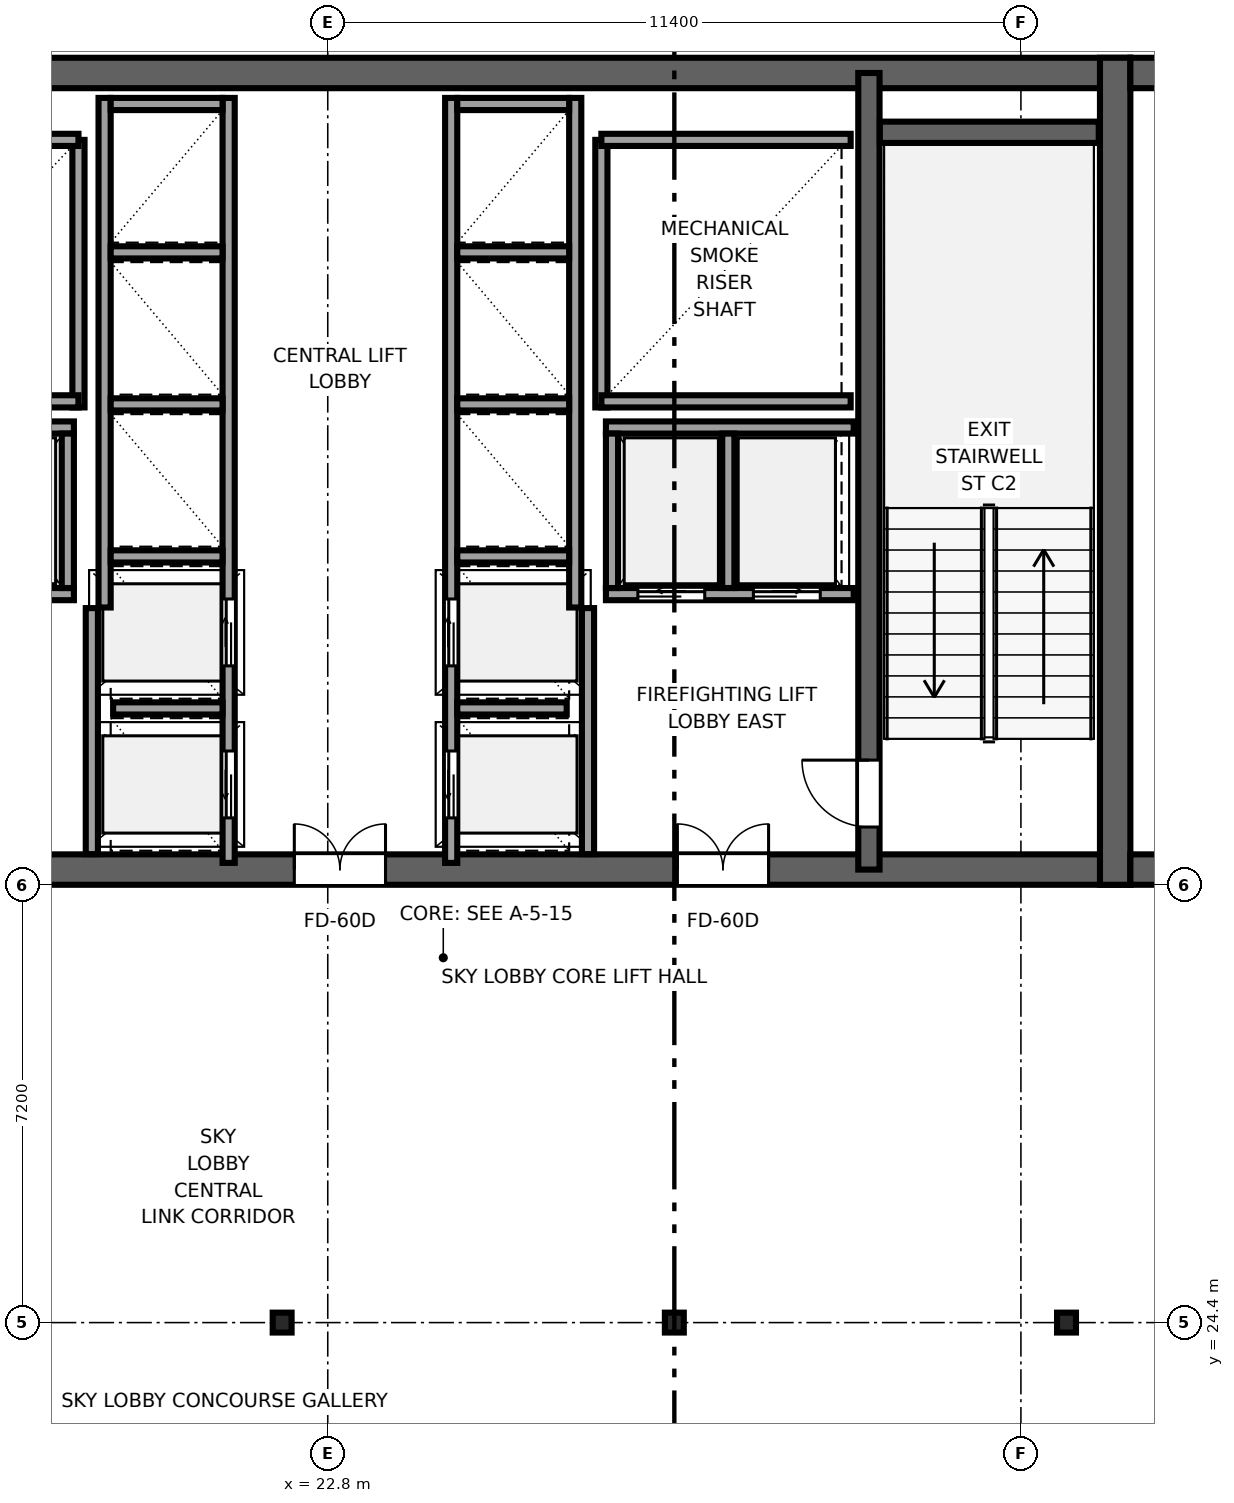
"""IFC4 building model, lengths in metres.
Left out: names, types, materials, properties, quantities, classifications, styles, units other than length and angle.
Written with IfcOpenShell. Run it as: python <this file> out.ifc"""

import sys

from ifc_helpers import new_model, si_unit, direction, frame, frame_2d, origin, origin_2d, place, context, subcontext, project, spatial, rectangle, i_section, extrude, source, transform, mapped, element, fill, save


model = new_model("IFC4")
c1 = context("Model", 3, precision=1e-05, world=origin(), true_north=direction((0.0, 1.0)))
c2 = subcontext(c1, "Body", "Model", "MODEL_VIEW")
j1 = project(units=[si_unit("LENGTHUNIT", "METRE"), si_unit("PLANEANGLEUNIT", "RADIAN")], contexts=[c1])
p1 = place(None, origin())
s1 = spatial("IfcSite", under=j1, at=p1, CompositionType="ELEMENT")
p2 = place(p1, origin())
s2 = spatial("IfcBuilding", under=s1, at=p2, CompositionType="ELEMENT")
p3 = place(p2, frame((0.0, 0.0, 205.3)))
s3 = spatial("IfcBuildingStorey", under=s2, at=p3, CompositionType="ELEMENT", Elevation=205.3)
p4 = place(p3, frame((10.0, 31.85, 0.0), z_axis=(0.0, 0.0, 1.0), x_axis=(1.0, 0.0, 0.0)))
e1 = element("IfcWall", 1, at=p4, inside=s3, PredefinedType="SHEAR", context=c2, shape_type="SweptSolid", body=[
    extrude(rectangle(XDim=26.0, YDim=0.5, at=frame_2d((13.0, 0.0))), origin(), (0.0, 0.0, 1.0), 4.4),
])
p5 = place(p4, frame((7.45, 0.0, 0.0), z_axis=(0.0, 0.0, 1.0), x_axis=(-1.0, 0.0, 0.0)))
e2 = element("IfcOpeningElement", 2, at=p5, cuts=e1, PredefinedType="OPENING", context=c2, shape_type="SweptSolid", body=[
    extrude(rectangle(XDim=1.5, YDim=2.04, at=frame_2d((0.75, 1.02))), frame((0.0, 0.26, 0.0), z_axis=(0.0, -1.0, 0.0), x_axis=(1.0, 0.0, 0.0)), (0.0, 0.0, 1.0), 0.52),
])
p6 = place(p4, frame((13.75, 0.0, 0.0), z_axis=(0.0, 0.0, 1.0), x_axis=(-1.0, 0.0, 0.0)))
e3 = element("IfcOpeningElement", 3, at=p6, cuts=e1, PredefinedType="OPENING", context=c2, shape_type="SweptSolid", body=[
    extrude(rectangle(XDim=1.5, YDim=2.04, at=frame_2d((0.75, 1.02))), frame((0.0, 0.26, 0.0), z_axis=(0.0, -1.0, 0.0), x_axis=(1.0, 0.0, 0.0)), (0.0, 0.0, 1.0), 0.52),
])
p7 = place(p4, frame((20.05, 0.0, 0.0), z_axis=(0.0, 0.0, 1.0), x_axis=(-1.0, 0.0, 0.0)))
e4 = element("IfcOpeningElement", 4, at=p7, cuts=e1, PredefinedType="OPENING", context=c2, shape_type="SweptSolid", body=[
    extrude(rectangle(XDim=1.5, YDim=2.04, at=frame_2d((0.75, 1.02))), frame((0.0, 0.26, 0.0), z_axis=(0.0, -1.0, 0.0), x_axis=(1.0, 0.0, 0.0)), (0.0, 0.0, 1.0), 0.52),
])
p8 = place(p3, frame((10.0, 44.95, 0.0), z_axis=(0.0, 0.0, 1.0), x_axis=(1.0, 0.0, 0.0)))
e5 = element("IfcWall", 5, at=p8, inside=s3, PredefinedType="SHEAR", context=c2, shape_type="SweptSolid", body=[
    extrude(rectangle(XDim=26.0, YDim=0.5, at=frame_2d((13.0, 0.0))), origin(), (0.0, 0.0, 1.0), 4.4),
])
p9 = place(p3, frame((35.75, 31.6, 0.0), z_axis=(0.0, 0.0, 1.0), x_axis=(0.0, 1.0, 0.0)))
e6 = element("IfcWall", 6, at=p9, inside=s3, PredefinedType="SHEAR", context=c2, shape_type="SweptSolid", body=[
    extrude(rectangle(XDim=13.6, YDim=0.5, at=frame_2d((6.8, 0.0))), origin(), (0.0, 0.0, 1.0), 4.4),
])
p10 = place(p3, frame((31.7, 31.85, 0.0), z_axis=(0.0, 0.0, 1.0), x_axis=(0.0, 1.0, 0.0)))
e7 = element("IfcWall", 7, at=p10, inside=s3, PredefinedType="SHEAR", context=c2, shape_type="SweptSolid", body=[
    extrude(rectangle(XDim=13.1, YDim=0.35, at=frame_2d((6.55, 0.0))), origin(), (0.0, 0.0, 1.0), 4.4),
])
p11 = place(p10, frame((1.8, 0.0, 0.0), z_axis=(0.0, 0.0, 1.0), x_axis=(-1.0, 0.0, 0.0)))
e8 = element("IfcOpeningElement", 8, at=p11, cuts=e7, PredefinedType="OPENING", context=c2, shape_type="SweptSolid", body=[
    extrude(rectangle(XDim=1.1, YDim=2.12, at=frame_2d((0.55, 1.06))), frame((0.0, 0.185, 0.0), z_axis=(0.0, -1.0, 0.0), x_axis=(1.0, 0.0, 0.0)), (0.0, 0.0, 1.0), 0.37),
])
p12 = place(p3, frame((36.0, 31.85, 0.0), z_axis=(0.0, 0.0, 1.0), x_axis=(1.0, 0.0, 0.0)))
e9 = element("IfcWall", 9, at=p12, inside=s3, PredefinedType="SHEAR", context=c2, shape_type="SweptSolid", body=[
    extrude(rectangle(XDim=3.8, YDim=0.5, at=frame_2d((1.9, 0.0))), origin(), (0.0, 0.0, 1.0), 4.4),
])
p13 = place(p12, frame((1.54, 0.0, 0.0), z_axis=(0.0, 0.0, 1.0), x_axis=(-1.0, 0.0, 0.0)))
e10 = element("IfcOpeningElement", 10, at=p13, cuts=e9, PredefinedType="OPENING", context=c2, shape_type="SweptSolid", body=[
    extrude(rectangle(XDim=1.02, YDim=2.03, at=frame_2d((0.51, 1.015))), frame((0.0, 0.26, 0.0), z_axis=(0.0, -1.0, 0.0), x_axis=(1.0, 0.0, 0.0)), (0.0, 0.0, 1.0), 0.52),
])
p14 = place(p3, frame((36.0, 44.95, 0.0), z_axis=(0.0, 0.0, 1.0), x_axis=(1.0, 0.0, 0.0)))
e11 = element("IfcWall", 11, at=p14, inside=s3, PredefinedType="SHEAR", context=c2, shape_type="SweptSolid", body=[
    extrude(rectangle(XDim=1.35, YDim=0.5, at=frame_2d((0.675, 0.0))), origin(), (0.0, 0.0, 1.0), 4.4),
])
p15 = place(p3, frame((31.88, 43.975, 0.0), z_axis=(0.0, 0.0, 1.0), x_axis=(1.0, 0.0, 0.0)))
e12 = element("IfcWall", 12, at=p15, inside=s3, PredefinedType="SHEAR", context=c2, shape_type="SweptSolid", body=[
    extrude(rectangle(XDim=3.6, YDim=0.35, at=frame_2d((1.8, 0.0))), origin(), (0.0, 0.0, 1.0), 4.4),
])
m1 = source(origin(), c2, "Body", "SweptSolid", [
    extrude(i_section(OverallWidth=0.311, OverallDepth=0.327, WebThickness=0.016, FlangeThickness=0.025, FilletRadius=0.017, at=origin_2d()), origin(), (0.0, 0.0, 1.0), 4.4),
])
for number, where, z_axis, x_axis in (
    (13, (22.05, 24.4, 0.0), (0.0, 0.0, 1.0), (1.0, 0.0, 0.0)),
    (14, (28.5, 24.4, 0.0), (0.0, 0.0, 1.0), (1.0, 0.0, 0.0)),
    (15, (34.95, 24.4, 0.0), (0.0, 0.0, 1.0), (1.0, 0.0, 0.0)),
):
    element("IfcColumn", number, at=place(p3, frame(where, z_axis=z_axis, x_axis=x_axis)), inside=s3, PredefinedType="COLUMN", context=c2, shape_type="MappedRepresentation", body=[
        mapped(m1, transform((0.0, 0.0, 0.0), x_axis=(1.0, 0.0, 0.0), y_axis=(0.0, 1.0, 0.0), z_axis=(0.0, 0.0, 1.0), scale=1.0)),
    ])
p16 = place(p3, frame((18.7, 39.45, 0.0), z_axis=(0.0, 0.0, 1.0), x_axis=(0.0, 1.0, 0.0)))
e16 = element("IfcWall", 16, at=p16, inside=s3, PredefinedType="SOLIDWALL", context=c2, shape_type="SweptSolid", body=[
    extrude(rectangle(XDim=4.4, YDim=0.2, at=frame_2d((2.2, 0.0))), origin(), (0.0, 0.0, 1.0), 4.22),
])
for number, where, z_axis, x_axis in (
    (17, (14.6, 39.55, 0.0), (0.0, 0.0, 1.0), (1.0, 0.0, 0.0)),
    (18, (14.6, 43.85, 0.0), (0.0, 0.0, 1.0), (1.0, 0.0, 0.0)),
):
    element("IfcWall", number, at=place(p3, frame(where, z_axis=z_axis, x_axis=x_axis)), inside=s3, PredefinedType="SOLIDWALL", context=c2, shape_type="SweptSolid", body=[
        extrude(rectangle(XDim=4.1, YDim=0.2, at=frame_2d((2.05, 0.0))), origin(), (0.0, 0.0, 1.0), 4.22),
    ])
p17 = place(p3, frame((27.3, 39.45, 0.0), z_axis=(0.0, 0.0, 1.0), x_axis=(0.0, 1.0, 0.0)))
e19 = element("IfcWall", 19, at=p17, inside=s3, PredefinedType="SOLIDWALL", context=c2, shape_type="SweptSolid", body=[
    extrude(rectangle(XDim=4.4, YDim=0.2, at=frame_2d((2.2, 0.0))), origin(), (0.0, 0.0, 1.0), 4.22),
])
for number, where, z_axis, x_axis in (
    (20, (27.3, 39.55, 0.0), (0.0, 0.0, 1.0), (1.0, 0.0, 0.0)),
    (21, (27.3, 43.85, 0.0), (0.0, 0.0, 1.0), (1.0, 0.0, 0.0)),
):
    element("IfcWall", number, at=place(p3, frame(where, z_axis=z_axis, x_axis=x_axis)), inside=s3, PredefinedType="SOLIDWALL", context=c2, shape_type="SweptSolid", body=[
        extrude(rectangle(XDim=4.1, YDim=0.2, at=frame_2d((2.05, 0.0))), origin(), (0.0, 0.0, 1.0), 4.22),
    ])
for number, where, z_axis, x_axis in (
    (22, (18.92, 32.104, 0.0), (0.0, 0.0, 1.0), (0.0, 1.0, 0.0)),
    (23, (27.08, 32.104, 0.0), (0.0, 0.0, 1.0), (0.0, 1.0, 0.0)),
):
    element("IfcWall", number, at=place(p3, frame(where, z_axis=z_axis, x_axis=x_axis)), inside=s3, PredefinedType="SOLIDWALL", context=c2, shape_type="SweptSolid", body=[
        extrude(rectangle(XDim=4.046, YDim=0.2, at=frame_2d((2.023, 0.0))), origin(), (0.0, 0.0, 1.0), 4.22),
    ])
p18 = place(p3, frame((21.17, 31.96, 0.0), z_axis=(0.0, 0.0, 1.0), x_axis=(0.0, 1.0, 0.0)))
e24 = element("IfcWall", 24, at=p18, inside=s3, PredefinedType="SOLIDWALL", context=c2, shape_type="SweptSolid", body=[
    extrude(rectangle(XDim=12.58, YDim=0.2, at=frame_2d((6.29, 0.0))), origin(), (0.0, 0.0, 1.0), 4.22),
])
p19 = place(p18, frame((0.74, 0.0, 0.0)))
e25 = element("IfcOpeningElement", 25, at=p19, cuts=e24, PredefinedType="OPENING", context=c2, shape_type="SweptSolid", body=[
    extrude(rectangle(XDim=1.1, YDim=2.12, at=frame_2d((0.55, 1.06))), frame((0.0, 0.11, 0.0), z_axis=(0.0, -1.0, 0.0), x_axis=(1.0, 0.0, 0.0)), (0.0, 0.0, 1.0), 0.22),
])
p20 = place(p18, frame((3.24, 0.0, 0.0)))
e26 = element("IfcOpeningElement", 26, at=p20, cuts=e24, PredefinedType="OPENING", context=c2, shape_type="SweptSolid", body=[
    extrude(rectangle(XDim=1.1, YDim=2.12, at=frame_2d((0.55, 1.06))), frame((0.0, 0.11, 0.0), z_axis=(0.0, -1.0, 0.0), x_axis=(1.0, 0.0, 0.0)), (0.0, 0.0, 1.0), 0.22),
])
p21 = place(p3, frame((19.13, 36.16, 0.0), z_axis=(0.0, 0.0, 1.0), x_axis=(0.0, 1.0, 0.0)))
e27 = element("IfcWall", 27, at=p21, inside=s3, PredefinedType="SOLIDWALL", context=c2, shape_type="SweptSolid", body=[
    extrude(rectangle(XDim=8.38, YDim=0.2, at=frame_2d((4.19, 0.0))), origin(), (0.0, 0.0, 1.0), 4.22),
])
p22 = place(p3, frame((19.23, 44.44, 0.0), z_axis=(0.0, 0.0, 1.0), x_axis=(1.0, 0.0, 0.0)))
e28 = element("IfcWall", 28, at=p22, inside=s3, PredefinedType="SOLIDWALL", context=c2, shape_type="SweptSolid", body=[
    extrude(rectangle(XDim=1.84, YDim=0.2, at=frame_2d((0.92, 0.0))), origin(), (0.0, 0.0, 1.0), 4.22),
])
p23 = place(p3, frame((19.27, 34.5, 0.0), z_axis=(0.0, 0.0, 1.0), x_axis=(1.0, 0.0, 0.0)))
e29 = element("IfcWall", 29, at=p23, inside=s3, PredefinedType="SOLIDWALL", context=c2, shape_type="SweptSolid", body=[
    extrude(rectangle(XDim=1.8, YDim=0.2, at=frame_2d((0.9, 0.0))), origin(), (0.0, 0.0, 1.0), 4.22),
])
for number, where, z_axis, x_axis in (
    (30, (19.23, 37.0, 0.0), (0.0, 0.0, 1.0), (1.0, 0.0, 0.0)),
    (31, (19.23, 39.5, 0.0), (0.0, 0.0, 1.0), (1.0, 0.0, 0.0)),
    (32, (19.23, 42.0, 0.0), (0.0, 0.0, 1.0), (1.0, 0.0, 0.0)),
):
    element("IfcWall", number, at=place(p3, frame(where, z_axis=z_axis, x_axis=x_axis)), inside=s3, PredefinedType="SOLIDWALL", context=c2, shape_type="SweptSolid", body=[
        extrude(rectangle(XDim=1.84, YDim=0.2, at=frame_2d((0.92, 0.0))), origin(), (0.0, 0.0, 1.0), 4.22),
    ])
p24 = place(p3, frame((27.375, 36.38, 0.0), z_axis=(0.0, 0.0, 1.0), x_axis=(1.0, 0.0, 0.0)))
e33 = element("IfcWall", 33, at=p24, inside=s3, PredefinedType="SOLIDWALL", context=c2, shape_type="SweptSolid", body=[
    extrude(rectangle(XDim=4.075, YDim=0.2, at=frame_2d((2.038, 0.0))), origin(), (0.0, 0.0, 1.0), 4.22),
])
p25 = place(p24, frame((0.525, 0.0, 0.0)))
e34 = element("IfcOpeningElement", 34, at=p25, cuts=e33, PredefinedType="OPENING", context=c2, shape_type="SweptSolid", body=[
    extrude(rectangle(XDim=1.1, YDim=2.12, at=frame_2d((0.55, 1.06))), frame((0.0, 0.11, 0.0), z_axis=(0.0, -1.0, 0.0), x_axis=(1.0, 0.0, 0.0)), (0.0, 0.0, 1.0), 0.22),
])
p26 = place(p24, frame((2.425, 0.0, 0.0)))
e35 = element("IfcOpeningElement", 35, at=p26, cuts=e33, PredefinedType="OPENING", context=c2, shape_type="SweptSolid", body=[
    extrude(rectangle(XDim=1.1, YDim=2.12, at=frame_2d((0.55, 1.06))), frame((0.0, 0.11, 0.0), z_axis=(0.0, -1.0, 0.0), x_axis=(1.0, 0.0, 0.0)), (0.0, 0.0, 1.0), 0.22),
])
p27 = place(p3, frame((27.375, 39.12, 0.0), z_axis=(0.0, 0.0, 1.0), x_axis=(1.0, 0.0, 0.0)))
e36 = element("IfcWall", 36, at=p27, inside=s3, PredefinedType="SOLIDWALL", context=c2, shape_type="SweptSolid", body=[
    extrude(rectangle(XDim=4.075, YDim=0.2, at=frame_2d((2.038, 0.0))), origin(), (0.0, 0.0, 1.0), 4.22),
])
for number, where, z_axis, x_axis in (
    (37, (27.475, 36.48, 0.0), (0.0, 0.0, 1.0), (0.0, 1.0, 0.0)),
    (38, (29.387, 36.48, 0.0), (0.0, 0.0, 1.0), (0.0, 1.0, 0.0)),
):
    element("IfcWall", number, at=place(p3, frame(where, z_axis=z_axis, x_axis=x_axis)), inside=s3, PredefinedType="SOLIDWALL", context=c2, shape_type="SweptSolid", body=[
        extrude(rectangle(XDim=2.54, YDim=0.2, at=frame_2d((1.27, 0.0))), origin(), (0.0, 0.0, 1.0), 4.22),
    ])
p28 = place(p3, frame((14.55, 36.38, 0.0), z_axis=(0.0, 0.0, 1.0), x_axis=(1.0, 0.0, 0.0)))
e39 = element("IfcWall", 39, at=p28, inside=s3, PredefinedType="SOLIDWALL", context=c2, shape_type="SweptSolid", body=[
    extrude(rectangle(XDim=4.075, YDim=0.2, at=frame_2d((2.038, 0.0))), origin(), (0.0, 0.0, 1.0), 4.22),
])
p29 = place(p28, frame((0.55, 0.0, 0.0)))
e40 = element("IfcOpeningElement", 40, at=p29, cuts=e39, PredefinedType="OPENING", context=c2, shape_type="SweptSolid", body=[
    extrude(rectangle(XDim=1.1, YDim=2.12, at=frame_2d((0.55, 1.06))), frame((0.0, 0.11, 0.0), z_axis=(0.0, -1.0, 0.0), x_axis=(1.0, 0.0, 0.0)), (0.0, 0.0, 1.0), 0.22),
])
p30 = place(p28, frame((2.45, 0.0, 0.0)))
e41 = element("IfcOpeningElement", 41, at=p30, cuts=e39, PredefinedType="OPENING", context=c2, shape_type="SweptSolid", body=[
    extrude(rectangle(XDim=1.1, YDim=2.12, at=frame_2d((0.55, 1.06))), frame((0.0, 0.11, 0.0), z_axis=(0.0, -1.0, 0.0), x_axis=(1.0, 0.0, 0.0)), (0.0, 0.0, 1.0), 0.22),
])
p31 = place(p3, frame((14.55, 39.12, 0.0), z_axis=(0.0, 0.0, 1.0), x_axis=(1.0, 0.0, 0.0)))
e42 = element("IfcWall", 42, at=p31, inside=s3, PredefinedType="SOLIDWALL", context=c2, shape_type="SweptSolid", body=[
    extrude(rectangle(XDim=4.075, YDim=0.2, at=frame_2d((2.038, 0.0))), origin(), (0.0, 0.0, 1.0), 4.22),
])
p32 = place(p3, frame((18.525, 36.48, 0.0), z_axis=(0.0, 0.0, 1.0), x_axis=(0.0, 1.0, 0.0)))
e43 = element("IfcWall", 43, at=p32, inside=s3, PredefinedType="SOLIDWALL", context=c2, shape_type="SweptSolid", body=[
    extrude(rectangle(XDim=2.54, YDim=0.2, at=frame_2d((1.27, 0.0))), origin(), (0.0, 0.0, 1.0), 4.22),
])
p33 = place(p3, frame((24.83, 31.96, 0.0), z_axis=(0.0, 0.0, 1.0), x_axis=(0.0, 1.0, 0.0)))
e44 = element("IfcWall", 44, at=p33, inside=s3, PredefinedType="SOLIDWALL", context=c2, shape_type="SweptSolid", body=[
    extrude(rectangle(XDim=12.58, YDim=0.2, at=frame_2d((6.29, 0.0))), origin(), (0.0, 0.0, 1.0), 4.22),
])
p34 = place(p33, frame((0.74, 0.0, 0.0)))
e45 = element("IfcOpeningElement", 45, at=p34, cuts=e44, PredefinedType="OPENING", context=c2, shape_type="SweptSolid", body=[
    extrude(rectangle(XDim=1.1, YDim=2.12, at=frame_2d((0.55, 1.06))), frame((0.0, 0.11, 0.0), z_axis=(0.0, -1.0, 0.0), x_axis=(1.0, 0.0, 0.0)), (0.0, 0.0, 1.0), 0.22),
])
p35 = place(p33, frame((3.24, 0.0, 0.0)))
e46 = element("IfcOpeningElement", 46, at=p35, cuts=e44, PredefinedType="OPENING", context=c2, shape_type="SweptSolid", body=[
    extrude(rectangle(XDim=1.1, YDim=2.12, at=frame_2d((0.55, 1.06))), frame((0.0, 0.11, 0.0), z_axis=(0.0, -1.0, 0.0), x_axis=(1.0, 0.0, 0.0)), (0.0, 0.0, 1.0), 0.22),
])
p36 = place(p3, frame((26.87, 36.16, 0.0), z_axis=(0.0, 0.0, 1.0), x_axis=(0.0, 1.0, 0.0)))
e47 = element("IfcWall", 47, at=p36, inside=s3, PredefinedType="SOLIDWALL", context=c2, shape_type="SweptSolid", body=[
    extrude(rectangle(XDim=8.38, YDim=0.2, at=frame_2d((4.19, 0.0))), origin(), (0.0, 0.0, 1.0), 4.22),
])
p37 = place(p3, frame((24.93, 44.44, 0.0), z_axis=(0.0, 0.0, 1.0), x_axis=(1.0, 0.0, 0.0)))
e48 = element("IfcWall", 48, at=p37, inside=s3, PredefinedType="SOLIDWALL", context=c2, shape_type="SweptSolid", body=[
    extrude(rectangle(XDim=1.84, YDim=0.2, at=frame_2d((0.92, 0.0))), origin(), (0.0, 0.0, 1.0), 4.22),
])
p38 = place(p3, frame((24.93, 34.5, 0.0), z_axis=(0.0, 0.0, 1.0), x_axis=(1.0, 0.0, 0.0)))
e49 = element("IfcWall", 49, at=p38, inside=s3, PredefinedType="SOLIDWALL", context=c2, shape_type="SweptSolid", body=[
    extrude(rectangle(XDim=1.8, YDim=0.2, at=frame_2d((0.9, 0.0))), origin(), (0.0, 0.0, 1.0), 4.22),
])
for number, where, z_axis, x_axis in (
    (50, (24.93, 37.0, 0.0), (0.0, 0.0, 1.0), (1.0, 0.0, 0.0)),
    (51, (24.93, 39.5, 0.0), (0.0, 0.0, 1.0), (1.0, 0.0, 0.0)),
    (52, (24.93, 42.0, 0.0), (0.0, 0.0, 1.0), (1.0, 0.0, 0.0)),
):
    element("IfcWall", number, at=place(p3, frame(where, z_axis=z_axis, x_axis=x_axis)), inside=s3, PredefinedType="SOLIDWALL", context=c2, shape_type="SweptSolid", body=[
        extrude(rectangle(XDim=1.84, YDim=0.2, at=frame_2d((0.92, 0.0))), origin(), (0.0, 0.0, 1.0), 4.22),
    ])
m2 = source(origin(), c2, "Body", "SweptSolid", [
    extrude(rectangle(XDim=1.1, YDim=2.12, at=frame_2d((0.55, 1.06))), frame((0.0, 0.025, 0.0), z_axis=(0.0, -1.0, 0.0), x_axis=(1.0, 0.0, 0.0)), (0.0, 0.0, 1.0), 0.05),
])
p39 = place(p11, origin())
e53 = element("IfcDoor", 53, at=p39, inside=s3, OperationType="SINGLE_SWING_RIGHT", PredefinedType="DOOR", context=c2, shape_type="MappedRepresentation", body=[
    mapped(m2, transform((0.0, 0.0, 0.0), x_axis=(1.0, 0.0, 0.0), y_axis=(0.0, 1.0, 0.0), z_axis=(0.0, 0.0, 1.0), scale=1.0)),
])
fill(e8, e53)
m3 = source(origin(), c2, "Body", "SweptSolid", [
    extrude(rectangle(XDim=1.5, YDim=2.04, at=frame_2d((0.75, 1.02))), frame((0.0, 0.025, 0.0), z_axis=(0.0, -1.0, 0.0), x_axis=(1.0, 0.0, 0.0)), (0.0, 0.0, 1.0), 0.05),
])
p40 = place(p6, origin())
e54 = element("IfcDoor", 54, at=p40, inside=s3, OperationType="DOUBLE_DOOR_SINGLE_SWING", PredefinedType="DOOR", context=c2, shape_type="MappedRepresentation", body=[
    mapped(m3, transform((0.0, 0.0, 0.0), x_axis=(1.0, 0.0, 0.0), y_axis=(0.0, 1.0, 0.0), z_axis=(0.0, 0.0, 1.0), scale=1.0)),
])
fill(e3, e54)
p41 = place(p7, origin())
e55 = element("IfcDoor", 55, at=p41, inside=s3, OperationType="DOUBLE_DOOR_SINGLE_SWING", PredefinedType="DOOR", context=c2, shape_type="MappedRepresentation", body=[
    mapped(m3, transform((0.0, 0.0, 0.0), x_axis=(1.0, 0.0, 0.0), y_axis=(0.0, 1.0, 0.0), z_axis=(0.0, 0.0, 1.0), scale=1.0)),
])
fill(e4, e55)
m4 = source(origin(), c2, "Body", "SweptSolid", [
    extrude(rectangle(XDim=1.1, YDim=2.12, at=frame_2d((0.55, 1.06))), frame((0.0, 0.025, 0.0), z_axis=(0.0, -1.0, 0.0), x_axis=(1.0, 0.0, 0.0)), (0.0, 0.0, 1.0), 0.05),
])
p42 = place(p19, origin())
e56 = element("IfcDoor", 56, at=p42, inside=s3, OperationType="SLIDING_TO_LEFT", PredefinedType="DOOR", context=c2, shape_type="MappedRepresentation", body=[
    mapped(m4, transform((0.0, 0.0, 0.0), x_axis=(1.0, 0.0, 0.0), y_axis=(0.0, 1.0, 0.0), z_axis=(0.0, 0.0, 1.0), scale=1.0)),
])
fill(e25, e56)
p43 = place(p20, origin())
e57 = element("IfcDoor", 57, at=p43, inside=s3, OperationType="SLIDING_TO_RIGHT", PredefinedType="DOOR", context=c2, shape_type="MappedRepresentation", body=[
    mapped(m4, transform((0.0, 0.0, 0.0), x_axis=(1.0, 0.0, 0.0), y_axis=(0.0, 1.0, 0.0), z_axis=(0.0, 0.0, 1.0), scale=1.0)),
])
fill(e26, e57)
p44 = place(p25, origin())
e58 = element("IfcDoor", 58, at=p44, inside=s3, OperationType="SLIDING_TO_LEFT", PredefinedType="DOOR", context=c2, shape_type="MappedRepresentation", body=[
    mapped(m4, transform((0.0, 0.0, 0.0), x_axis=(1.0, 0.0, 0.0), y_axis=(0.0, 1.0, 0.0), z_axis=(0.0, 0.0, 1.0), scale=1.0)),
])
fill(e34, e58)
p45 = place(p26, origin())
e59 = element("IfcDoor", 59, at=p45, inside=s3, OperationType="SLIDING_TO_RIGHT", PredefinedType="DOOR", context=c2, shape_type="MappedRepresentation", body=[
    mapped(m4, transform((0.0, 0.0, 0.0), x_axis=(1.0, 0.0, 0.0), y_axis=(0.0, 1.0, 0.0), z_axis=(0.0, 0.0, 1.0), scale=1.0)),
])
fill(e35, e59)
p46 = place(p34, origin())
e60 = element("IfcDoor", 60, at=p46, inside=s3, OperationType="SLIDING_TO_LEFT", PredefinedType="DOOR", context=c2, shape_type="MappedRepresentation", body=[
    mapped(m4, transform((0.0, 0.0, 0.0), x_axis=(1.0, 0.0, 0.0), y_axis=(0.0, 1.0, 0.0), z_axis=(0.0, 0.0, 1.0), scale=1.0)),
])
fill(e45, e60)
p47 = place(p35, origin())
e61 = element("IfcDoor", 61, at=p47, inside=s3, OperationType="SLIDING_TO_RIGHT", PredefinedType="DOOR", context=c2, shape_type="MappedRepresentation", body=[
    mapped(m4, transform((0.0, 0.0, 0.0), x_axis=(1.0, 0.0, 0.0), y_axis=(0.0, 1.0, 0.0), z_axis=(0.0, 0.0, 1.0), scale=1.0)),
])
fill(e46, e61)
save(model, sys.argv[1])
